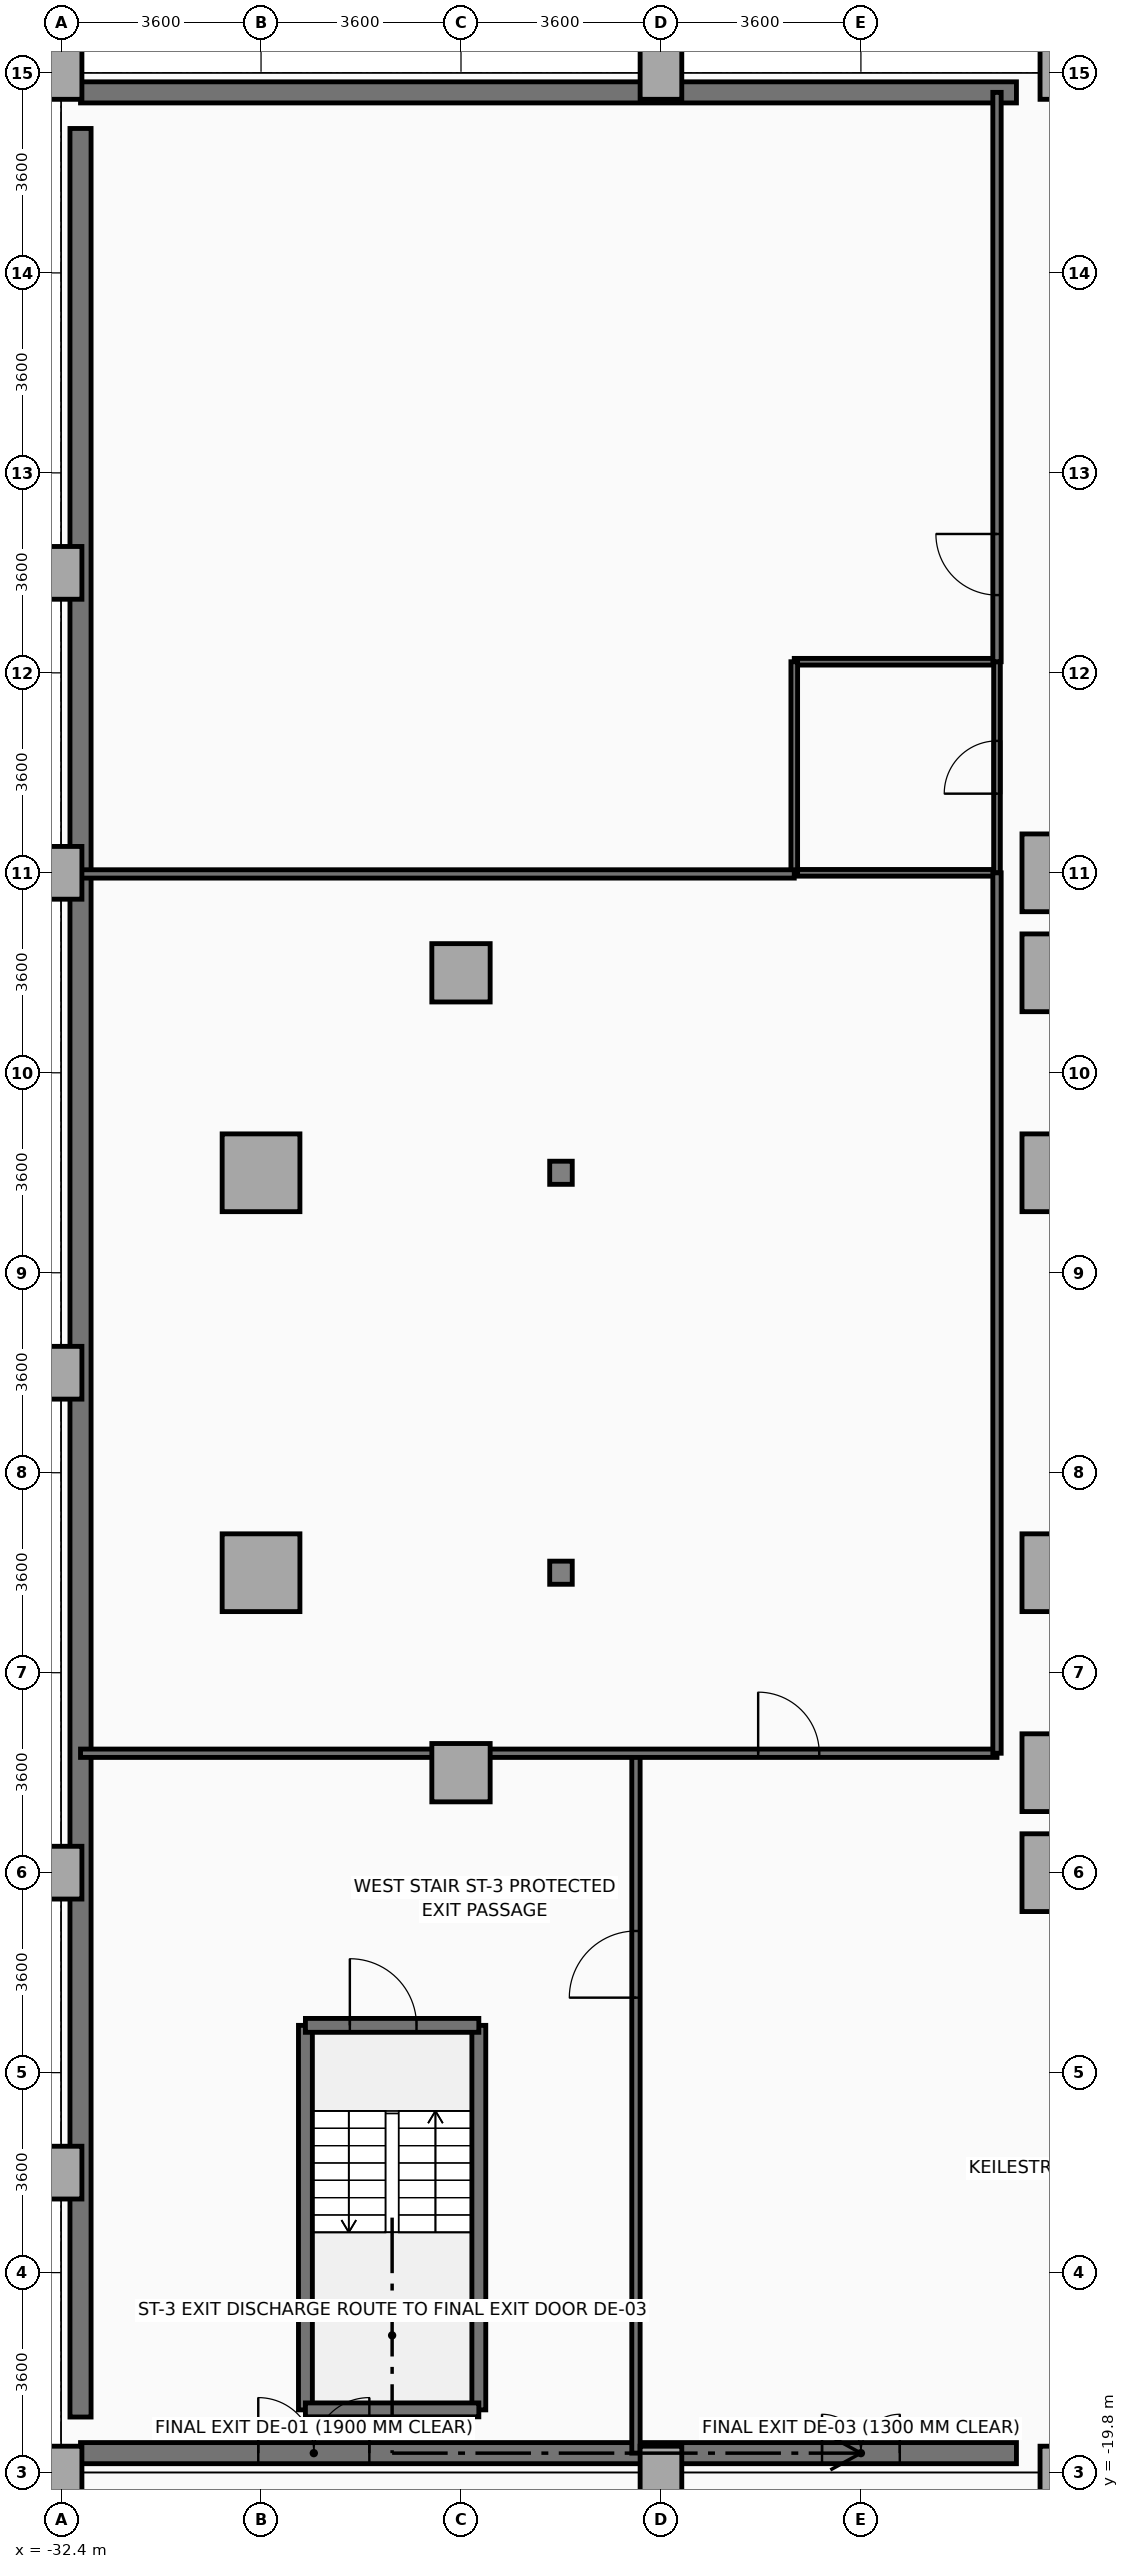
"""IFC4 building model, lengths in metres.
Left out: names, types, materials, properties, quantities, classifications, styles, units other than length and angle.
Written with IfcOpenShell. Run it as: python <this file> out.ifc"""

import sys

from ifc_helpers import new_model, si_unit, direction, frame, frame_2d, origin, origin_2d, place, context, subcontext, project, spatial, rectangle, i_section, extrude, source, transform, mapped, element, fill, save


model = new_model("IFC4")
c1 = context("Model", 3, precision=1e-05, world=origin(), true_north=direction((0.0, 1.0)))
c2 = subcontext(c1, "Body", "Model", "MODEL_VIEW")
j1 = project(units=[si_unit("LENGTHUNIT", "METRE"), si_unit("PLANEANGLEUNIT", "RADIAN")], contexts=[c1])
p1 = place(None, origin())
s1 = spatial("IfcSite", under=j1, at=p1, CompositionType="ELEMENT")
p2 = place(p1, origin())
s2 = spatial("IfcBuilding", under=s1, at=p2, CompositionType="ELEMENT")
p3 = place(p2, origin())
s3 = spatial("IfcBuildingStorey", under=s2, at=p3, CompositionType="ELEMENT", Elevation=0.0)
m1 = source(origin(), c2, "Body", "SweptSolid", [
    extrude(rectangle(XDim=0.75, YDim=0.95, at=origin_2d()), origin(), (0.0, 0.0, 1.0), 5.15),
])
for number, where, z_axis, x_axis in (
    (1, (-32.4, -19.8, 0.0), (0.0, 0.0, 1.0), (1.0, 0.0, 0.0)),
    (2, (-32.4, -14.4, 0.0), (0.0, 0.0, 1.0), (1.0, 0.0, 0.0)),
    (3, (-32.4, -9.0, 0.0), (0.0, 0.0, 1.0), (1.0, 0.0, 0.0)),
    (4, (-32.4, 0.0, 0.0), (0.0, 0.0, 1.0), (1.0, 0.0, 0.0)),
    (5, (-32.4, 9.0, 0.0), (0.0, 0.0, 1.0), (1.0, 0.0, 0.0)),
    (6, (-32.4, 14.4, 0.0), (0.0, 0.0, 1.0), (1.0, 0.0, 0.0)),
    (7, (-32.4, 23.4, 0.0), (0.0, 0.0, 1.0), (1.0, 0.0, 0.0)),
):
    element("IfcColumn", number, at=place(p3, frame(where, z_axis=z_axis, x_axis=x_axis)), inside=s3, PredefinedType="COLUMN", context=c2, shape_type="MappedRepresentation", body=[
        mapped(m1, transform((0.0, 0.0, 0.0), x_axis=(1.0, 0.0, 0.0), y_axis=(0.0, 1.0, 0.0), z_axis=(0.0, 0.0, 1.0), scale=1.0)),
    ])
m2 = source(origin(), c2, "Body", "SweptSolid", [
    extrude(rectangle(XDim=1.4, YDim=1.4, at=origin_2d()), origin(), (0.0, 0.0, 1.0), 5.15),
])
for number, where, z_axis, x_axis in (
    (8, (-28.8, -3.6, 0.0), (0.0, 0.0, 1.0), (1.0, 0.0, 0.0)),
    (9, (-28.8, 3.6, 0.0), (0.0, 0.0, 1.0), (1.0, 0.0, 0.0)),
):
    element("IfcColumn", number, at=place(p3, frame(where, z_axis=z_axis, x_axis=x_axis)), inside=s3, PredefinedType="COLUMN", context=c2, shape_type="MappedRepresentation", body=[
        mapped(m2, transform((0.0, 0.0, 0.0), x_axis=(1.0, 0.0, 0.0), y_axis=(0.0, 1.0, 0.0), z_axis=(0.0, 0.0, 1.0), scale=1.0)),
    ])
m3 = source(origin(), c2, "Body", "SweptSolid", [
    extrude(rectangle(XDim=1.05, YDim=1.05, at=origin_2d()), origin(), (0.0, 0.0, 1.0), 5.15),
])
for number, where, z_axis, x_axis in (
    (10, (-25.2, -7.2, 0.0), (0.0, 0.0, 1.0), (1.0, 0.0, 0.0)),
    (11, (-25.2, 7.2, 0.0), (0.0, 0.0, 1.0), (1.0, 0.0, 0.0)),
):
    element("IfcColumn", number, at=place(p3, frame(where, z_axis=z_axis, x_axis=x_axis)), inside=s3, PredefinedType="COLUMN", context=c2, shape_type="MappedRepresentation", body=[
        mapped(m3, transform((0.0, 0.0, 0.0), x_axis=(1.0, 0.0, 0.0), y_axis=(0.0, 1.0, 0.0), z_axis=(0.0, 0.0, 1.0), scale=1.0)),
    ])
m4 = source(origin(), c2, "Body", "SweptSolid", [
    extrude(i_section(OverallWidth=0.406, OverallDepth=0.416, WebThickness=0.024, FlangeThickness=0.039, at=origin_2d()), origin(), (0.0, 0.0, 1.0), 5.15),
])
for number, where, z_axis, x_axis in (
    (12, (-23.4, -3.6, 0.0), (0.0, 0.0, 1.0), (1.0, 0.0, 0.0)),
    (13, (-23.4, 3.6, 0.0), (0.0, 0.0, 1.0), (1.0, 0.0, 0.0)),
):
    element("IfcColumn", number, at=place(p3, frame(where, z_axis=z_axis, x_axis=x_axis)), inside=s3, PredefinedType="COLUMN", context=c2, shape_type="MappedRepresentation", body=[
        mapped(m4, transform((0.0, 0.0, 0.0), x_axis=(1.0, 0.0, 0.0), y_axis=(0.0, 1.0, 0.0), z_axis=(0.0, 0.0, 1.0), scale=1.0)),
    ])
for number, where, z_axis, x_axis in (
    (14, (-21.6, -19.8, 0.0), (0.0, 0.0, 1.0), (1.0, 0.0, 0.0)),
    (15, (-21.6, 23.4, 0.0), (0.0, 0.0, 1.0), (1.0, 0.0, 0.0)),
    (16, (-14.4, -19.8, 0.0), (0.0, 0.0, 1.0), (1.0, 0.0, 0.0)),
):
    element("IfcColumn", number, at=place(p3, frame(where, z_axis=z_axis, x_axis=x_axis)), inside=s3, PredefinedType="COLUMN", context=c2, shape_type="MappedRepresentation", body=[
        mapped(m1, transform((0.0, 0.0, 0.0), x_axis=(1.0, 0.0, 0.0), y_axis=(0.0, 1.0, 0.0), z_axis=(0.0, 0.0, 1.0), scale=1.0)),
    ])
for number, where, z_axis, x_axis in (
    (17, (-14.4, -9.0, 0.0), (0.0, 0.0, 1.0), (1.0, 0.0, 0.0)),
    (18, (-14.4, -7.2, 0.0), (0.0, 0.0, 1.0), (1.0, 0.0, 0.0)),
    (19, (-14.4, -3.6, 0.0), (0.0, 0.0, 1.0), (1.0, 0.0, 0.0)),
    (20, (-14.4, 3.6, 0.0), (0.0, 0.0, 1.0), (1.0, 0.0, 0.0)),
    (21, (-14.4, 7.2, 0.0), (0.0, 0.0, 1.0), (1.0, 0.0, 0.0)),
    (22, (-14.4, 9.0, 0.0), (0.0, 0.0, 1.0), (1.0, 0.0, 0.0)),
):
    element("IfcColumn", number, at=place(p3, frame(where, z_axis=z_axis, x_axis=x_axis)), inside=s3, PredefinedType="COLUMN", context=c2, shape_type="MappedRepresentation", body=[
        mapped(m2, transform((0.0, 0.0, 0.0), x_axis=(1.0, 0.0, 0.0), y_axis=(0.0, 1.0, 0.0), z_axis=(0.0, 0.0, 1.0), scale=1.0)),
    ])
p4 = place(p3, frame((-14.4, 23.4, 0.0), z_axis=(0.0, 0.0, 1.0), x_axis=(1.0, 0.0, 0.0)))
e23 = element("IfcColumn", 23, at=p4, inside=s3, PredefinedType="COLUMN", context=c2, shape_type="MappedRepresentation", body=[
    mapped(m1, transform((0.0, 0.0, 0.0), x_axis=(1.0, 0.0, 0.0), y_axis=(0.0, 1.0, 0.0), z_axis=(0.0, 0.0, 1.0), scale=1.0)),
])
p5 = place(p3, frame((-32.05, -19.45, 0.0), z_axis=(0.0, 0.0, 1.0), x_axis=(1.0, 0.0, 0.0)))
e24 = element("IfcWall", 24, at=p5, inside=s3, PredefinedType="SOLIDWALL", context=c2, shape_type="SweptSolid", body=[
    extrude(rectangle(XDim=16.85, YDim=0.38, at=frame_2d((8.425, 0.0))), origin(), (0.0, 0.0, 1.0), 4.4),
])
p6 = place(p5, frame((3.2, 0.0, 0.0)))
e25 = element("IfcOpeningElement", 25, at=p6, cuts=e24, PredefinedType="OPENING", context=c2, shape_type="SweptSolid", body=[
    extrude(rectangle(XDim=2.0, YDim=2.6, at=frame_2d((1.0, 1.3))), frame((0.0, 0.2, 0.0), z_axis=(0.0, -1.0, 0.0), x_axis=(1.0, 0.0, 0.0)), (0.0, 0.0, 1.0), 0.4),
])
p7 = place(p5, frame((13.35, 0.0, 0.0)))
e26 = element("IfcOpeningElement", 26, at=p7, cuts=e24, PredefinedType="OPENING", context=c2, shape_type="SweptSolid", body=[
    extrude(rectangle(XDim=1.4, YDim=2.4, at=frame_2d((0.7, 1.2))), frame((0.0, 0.2, 0.0), z_axis=(0.0, -1.0, 0.0), x_axis=(1.0, 0.0, 0.0)), (0.0, 0.0, 1.0), 0.4),
])
p8 = place(p3, frame((-32.05, 23.05, 0.0), z_axis=(0.0, 0.0, 1.0), x_axis=(1.0, 0.0, 0.0)))
e27 = element("IfcWall", 27, at=p8, inside=s3, PredefinedType="SOLIDWALL", context=c2, shape_type="SweptSolid", body=[
    extrude(rectangle(XDim=16.85, YDim=0.38, at=frame_2d((8.425, 0.0))), origin(), (0.0, 0.0, 1.0), 4.4),
])
p9 = place(p3, frame((-32.05, -18.8, 0.0), z_axis=(0.0, 0.0, 1.0), x_axis=(0.0, 1.0, 0.0)))
e28 = element("IfcWall", 28, at=p9, inside=s3, PredefinedType="SOLIDWALL", context=c2, shape_type="SweptSolid", body=[
    extrude(rectangle(XDim=41.2, YDim=0.38, at=frame_2d((20.6, 0.0))), origin(), (0.0, 0.0, 1.0), 4.4),
])
for number, where, z_axis, x_axis in (
    (29, (-28.001, -18.671, 0.0), (0.0, 0.0, 1.0), (0.0, 1.0, 0.0)),
    (30, (-24.879, -18.671, 0.0), (0.0, 0.0, 1.0), (0.0, 1.0, 0.0)),
):
    element("IfcWall", number, at=place(p3, frame(where, z_axis=z_axis, x_axis=x_axis)), inside=s3, PredefinedType="SOLIDWALL", context=c2, shape_type="SweptSolid", body=[
        extrude(rectangle(XDim=6.922, YDim=0.25, at=frame_2d((3.461, 0.0))), origin(), (0.0, 0.0, 1.0), 5.15),
    ])
p10 = place(p3, frame((-28.001, -18.671, 0.0), z_axis=(0.0, 0.0, 1.0), x_axis=(1.0, 0.0, 0.0)))
e31 = element("IfcWall", 31, at=p10, inside=s3, PredefinedType="SOLIDWALL", context=c2, shape_type="SweptSolid", body=[
    extrude(rectangle(XDim=3.122, YDim=0.25, at=frame_2d((1.561, 0.0))), origin(), (0.0, 0.0, 1.0), 5.15),
])
p11 = place(p3, frame((-28.001, -11.749, 0.0), z_axis=(0.0, 0.0, 1.0), x_axis=(1.0, 0.0, 0.0)))
e32 = element("IfcWall", 32, at=p11, inside=s3, PredefinedType="SOLIDWALL", context=c2, shape_type="SweptSolid", body=[
    extrude(rectangle(XDim=3.122, YDim=0.25, at=frame_2d((1.561, 0.0))), origin(), (0.0, 0.0, 1.0), 5.15),
])
p12 = place(p11, frame((0.8, 0.0, 0.0)))
e33 = element("IfcOpeningElement", 33, at=p12, cuts=e32, PredefinedType="OPENING", context=c2, shape_type="SweptSolid", body=[
    extrude(rectangle(XDim=1.2, YDim=2.2, at=frame_2d((0.6, 1.1))), frame((0.0, 0.135, 0.0), z_axis=(0.0, -1.0, 0.0), x_axis=(1.0, 0.0, 0.0)), (0.0, 0.0, 1.0), 0.27),
])
for number, where, z_axis, x_axis in (
    (34, (-19.2, 9.0, 0.0), (0.0, 0.0, 1.0), (1.0, 0.0, 0.0)),
    (35, (-19.2, 12.8, 0.0), (0.0, 0.0, 1.0), (1.0, 0.0, 0.0)),
):
    element("IfcWall", number, at=place(p3, frame(where, z_axis=z_axis, x_axis=x_axis)), inside=s3, PredefinedType="PARTITIONING", context=c2, shape_type="SweptSolid", body=[
        extrude(rectangle(XDim=3.65, YDim=0.12, at=frame_2d((1.825, 0.0))), origin(), (0.0, 0.0, 1.0), 5.15),
    ])
p13 = place(p3, frame((-19.2, 9.0, 0.0), z_axis=(0.0, 0.0, 1.0), x_axis=(0.0, 1.0, 0.0)))
e36 = element("IfcWall", 36, at=p13, inside=s3, PredefinedType="PARTITIONING", context=c2, shape_type="SweptSolid", body=[
    extrude(rectangle(XDim=3.8, YDim=0.12, at=frame_2d((1.9, 0.0))), origin(), (0.0, 0.0, 1.0), 5.15),
])
p14 = place(p3, frame((-15.55, 9.0, 0.0), z_axis=(0.0, 0.0, 1.0), x_axis=(0.0, 1.0, 0.0)))
e37 = element("IfcWall", 37, at=p14, inside=s3, PredefinedType="PARTITIONING", context=c2, shape_type="SweptSolid", body=[
    extrude(rectangle(XDim=3.8, YDim=0.12, at=frame_2d((1.9, 0.0))), origin(), (0.0, 0.0, 1.0), 5.15),
])
p15 = place(p14, frame((1.425, 0.0, 0.0)))
e38 = element("IfcOpeningElement", 38, at=p15, cuts=e37, PredefinedType="OPENING", context=c2, shape_type="SweptSolid", body=[
    extrude(rectangle(XDim=0.95, YDim=2.15, at=frame_2d((0.475, 1.075))), frame((0.0, 0.07, 0.0), z_axis=(0.0, -1.0, 0.0), x_axis=(1.0, 0.0, 0.0)), (0.0, 0.0, 1.0), 0.14),
])
p16 = place(p3, frame((-22.05, -19.45, 0.0), z_axis=(0.0, 0.0, 1.0), x_axis=(0.0, 1.0, 0.0)))
e39 = element("IfcWall", 39, at=p16, inside=s3, PredefinedType="PARTITIONING", context=c2, shape_type="SweptSolid", body=[
    extrude(rectangle(XDim=12.6, YDim=0.15, at=frame_2d((6.3, 0.0))), origin(), (0.0, 0.0, 1.0), 3.8),
])
p17 = place(p16, frame((8.2, 0.0, 0.0)))
e40 = element("IfcOpeningElement", 40, at=p17, cuts=e39, PredefinedType="OPENING", context=c2, shape_type="SweptSolid", body=[
    extrude(rectangle(XDim=1.2, YDim=2.2, at=frame_2d((0.6, 1.1))), frame((0.0, 0.085, 0.0), z_axis=(0.0, -1.0, 0.0), x_axis=(1.0, 0.0, 0.0)), (0.0, 0.0, 1.0), 0.17),
])
p18 = place(p3, frame((-32.05, -6.85, 0.0), z_axis=(0.0, 0.0, 1.0), x_axis=(1.0, 0.0, 0.0)))
e41 = element("IfcWall", 41, at=p18, inside=s3, PredefinedType="PARTITIONING", context=c2, shape_type="SweptSolid", body=[
    extrude(rectangle(XDim=16.5, YDim=0.15, at=frame_2d((8.25, 0.0))), origin(), (0.0, 0.0, 1.0), 3.8),
])
p19 = place(p18, frame((12.2, 0.0, 0.0)))
e42 = element("IfcOpeningElement", 42, at=p19, cuts=e41, PredefinedType="OPENING", context=c2, shape_type="SweptSolid", body=[
    extrude(rectangle(XDim=1.1, YDim=2.2, at=frame_2d((0.55, 1.1))), frame((0.0, 0.085, 0.0), z_axis=(0.0, -1.0, 0.0), x_axis=(1.0, 0.0, 0.0)), (0.0, 0.0, 1.0), 0.17),
])
p20 = place(p3, frame((-15.55, -6.85, 0.0), z_axis=(0.0, 0.0, 1.0), x_axis=(0.0, 1.0, 0.0)))
e43 = element("IfcWall", 43, at=p20, inside=s3, PredefinedType="PARTITIONING", context=c2, shape_type="SweptSolid", body=[
    extrude(rectangle(XDim=15.85, YDim=0.15, at=frame_2d((7.925, 0.0))), origin(), (0.0, 0.0, 1.0), 3.8),
])
p21 = place(p3, frame((-32.05, 8.98, 0.0), z_axis=(0.0, 0.0, 1.0), x_axis=(1.0, 0.0, 0.0)))
e44 = element("IfcWall", 44, at=p21, inside=s3, PredefinedType="PARTITIONING", context=c2, shape_type="SweptSolid", body=[
    extrude(rectangle(XDim=12.85, YDim=0.15, at=frame_2d((6.425, 0.0))), origin(), (0.0, 0.0, 1.0), 5.15),
])
p22 = place(p3, frame((-15.55, 12.8, 0.0), z_axis=(0.0, 0.0, 1.0), x_axis=(0.0, 1.0, 0.0)))
e45 = element("IfcWall", 45, at=p22, inside=s3, PredefinedType="PARTITIONING", context=c2, shape_type="SweptSolid", body=[
    extrude(rectangle(XDim=10.25, YDim=0.15, at=frame_2d((5.125, 0.0))), origin(), (0.0, 0.0, 1.0), 5.15),
])
p23 = place(p22, frame((1.2, 0.0, 0.0)))
e46 = element("IfcOpeningElement", 46, at=p23, cuts=e45, PredefinedType="OPENING", context=c2, shape_type="SweptSolid", body=[
    extrude(rectangle(XDim=1.1, YDim=2.2, at=frame_2d((0.55, 1.1))), frame((0.0, 0.085, 0.0), z_axis=(0.0, -1.0, 0.0), x_axis=(1.0, 0.0, 0.0)), (0.0, 0.0, 1.0), 0.17),
])
m5 = source(origin(), c2, "Body", "SweptSolid", [
    extrude(rectangle(XDim=2.0, YDim=2.6, at=frame_2d((1.0, 1.3))), frame((0.0, 0.025, 0.0), z_axis=(0.0, -1.0, 0.0), x_axis=(1.0, 0.0, 0.0)), (0.0, 0.0, 1.0), 0.05),
])
p24 = place(p6, frame((2.0, 0.0, 0.0), z_axis=(0.0, 0.0, 1.0), x_axis=(-1.0, 0.0, 0.0)))
e47 = element("IfcDoor", 47, at=p24, inside=s3, OperationType="DOUBLE_DOOR_SINGLE_SWING", PredefinedType="DOOR", context=c2, shape_type="MappedRepresentation", body=[
    mapped(m5, transform((0.0, 0.0, 0.0), x_axis=(1.0, 0.0, 0.0), y_axis=(0.0, 1.0, 0.0), z_axis=(0.0, 0.0, 1.0), scale=1.0)),
])
fill(e25, e47)
m6 = source(origin(), c2, "Body", "SweptSolid", [
    extrude(rectangle(XDim=1.4, YDim=2.4, at=frame_2d((0.7, 1.2))), frame((0.0, 0.025, 0.0), z_axis=(0.0, -1.0, 0.0), x_axis=(1.0, 0.0, 0.0)), (0.0, 0.0, 1.0), 0.05),
])
p25 = place(p7, frame((1.4, 0.0, 0.0), z_axis=(0.0, 0.0, 1.0), x_axis=(-1.0, 0.0, 0.0)))
e48 = element("IfcDoor", 48, at=p25, inside=s3, OperationType="DOUBLE_DOOR_SINGLE_SWING", PredefinedType="DOOR", context=c2, shape_type="MappedRepresentation", body=[
    mapped(m6, transform((0.0, 0.0, 0.0), x_axis=(1.0, 0.0, 0.0), y_axis=(0.0, 1.0, 0.0), z_axis=(0.0, 0.0, 1.0), scale=1.0)),
])
fill(e26, e48)
m7 = source(origin(), c2, "Body", "SweptSolid", [
    extrude(rectangle(XDim=1.2, YDim=2.2, at=frame_2d((0.6, 1.1))), frame((0.0, 0.025, 0.0), z_axis=(0.0, -1.0, 0.0), x_axis=(1.0, 0.0, 0.0)), (0.0, 0.0, 1.0), 0.05),
])
p26 = place(p12, origin())
e49 = element("IfcDoor", 49, at=p26, inside=s3, OperationType="SINGLE_SWING_LEFT", PredefinedType="DOOR", context=c2, shape_type="MappedRepresentation", body=[
    mapped(m7, transform((0.0, 0.0, 0.0), x_axis=(1.0, 0.0, 0.0), y_axis=(0.0, 1.0, 0.0), z_axis=(0.0, 0.0, 1.0), scale=1.0)),
])
fill(e33, e49)
m8 = source(origin(), c2, "Body", "SweptSolid", [
    extrude(rectangle(XDim=0.95, YDim=2.15, at=frame_2d((0.475, 1.075))), frame((0.0, 0.025, 0.0), z_axis=(0.0, -1.0, 0.0), x_axis=(1.0, 0.0, 0.0)), (0.0, 0.0, 1.0), 0.05),
])
p27 = place(p15, origin())
e50 = element("IfcDoor", 50, at=p27, inside=s3, OperationType="SINGLE_SWING_LEFT", PredefinedType="DOOR", context=c2, shape_type="MappedRepresentation", body=[
    mapped(m8, transform((0.0, 0.0, 0.0), x_axis=(1.0, 0.0, 0.0), y_axis=(0.0, 1.0, 0.0), z_axis=(0.0, 0.0, 1.0), scale=1.0)),
])
fill(e38, e50)
p28 = place(p17, origin())
e51 = element("IfcDoor", 51, at=p28, inside=s3, OperationType="SINGLE_SWING_LEFT", PredefinedType="DOOR", context=c2, shape_type="MappedRepresentation", body=[
    mapped(m7, transform((0.0, 0.0, 0.0), x_axis=(1.0, 0.0, 0.0), y_axis=(0.0, 1.0, 0.0), z_axis=(0.0, 0.0, 1.0), scale=1.0)),
])
fill(e40, e51)
m9 = source(origin(), c2, "Body", "SweptSolid", [
    extrude(rectangle(XDim=1.1, YDim=2.2, at=frame_2d((0.55, 1.1))), frame((0.0, 0.025, 0.0), z_axis=(0.0, -1.0, 0.0), x_axis=(1.0, 0.0, 0.0)), (0.0, 0.0, 1.0), 0.05),
])
p29 = place(p19, origin())
e52 = element("IfcDoor", 52, at=p29, inside=s3, OperationType="SINGLE_SWING_LEFT", PredefinedType="DOOR", context=c2, shape_type="MappedRepresentation", body=[
    mapped(m9, transform((0.0, 0.0, 0.0), x_axis=(1.0, 0.0, 0.0), y_axis=(0.0, 1.0, 0.0), z_axis=(0.0, 0.0, 1.0), scale=1.0)),
])
fill(e42, e52)
p30 = place(p23, origin())
e53 = element("IfcDoor", 53, at=p30, inside=s3, OperationType="SINGLE_SWING_RIGHT", PredefinedType="DOOR", context=c2, shape_type="MappedRepresentation", body=[
    mapped(m9, transform((0.0, 0.0, 0.0), x_axis=(1.0, 0.0, 0.0), y_axis=(0.0, 1.0, 0.0), z_axis=(0.0, 0.0, 1.0), scale=1.0)),
])
fill(e46, e53)
save(model, sys.argv[1])
